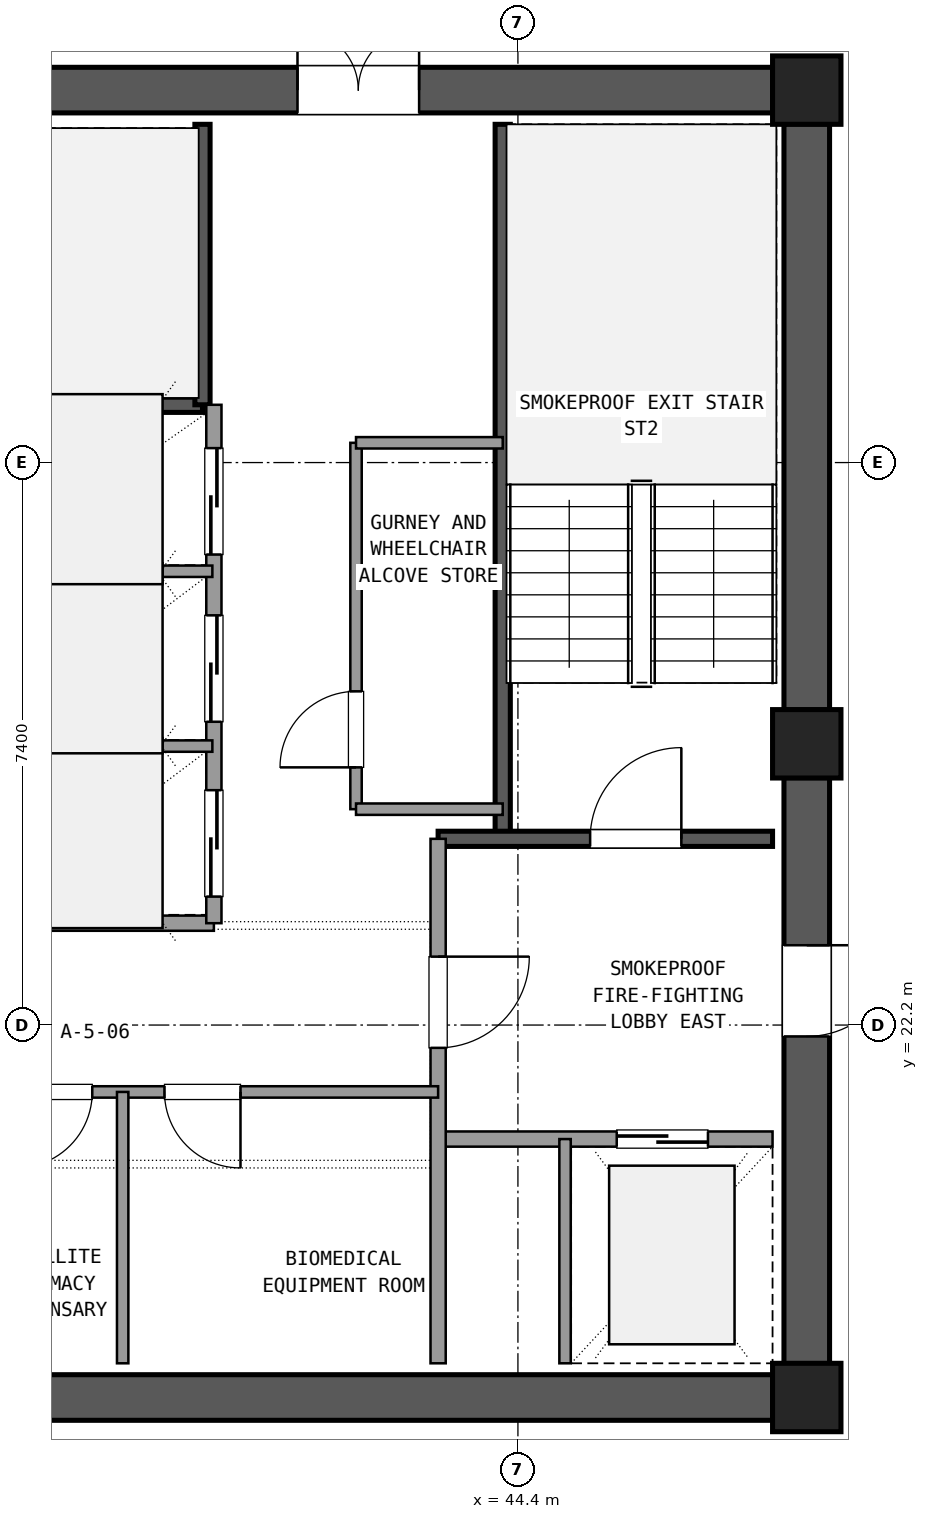
"""IFC4 building model, lengths in metres.
Left out: names, types, materials, properties, quantities, classifications, styles, units other than length and angle.
Written with IfcOpenShell. Run it as: python <this file> out.ifc"""

import sys

from ifc_helpers import new_model, si_unit, direction, frame, frame_2d, origin, origin_2d, place, context, subcontext, project, spatial, rectangle, extrude, element, fill, save


model = new_model("IFC4")
c1 = context("Model", 3, precision=1e-05, world=origin(), true_north=direction((0.0, 1.0)))
c2 = subcontext(c1, "Body", "Model", "MODEL_VIEW")
j1 = project(units=[si_unit("LENGTHUNIT", "METRE"), si_unit("PLANEANGLEUNIT", "RADIAN")], contexts=[c1])
p1 = place(None, origin())
s1 = spatial("IfcSite", under=j1, at=p1, CompositionType="ELEMENT")
p2 = place(p1, origin())
s2 = spatial("IfcBuilding", under=s1, at=p2, CompositionType="ELEMENT")
p3 = place(p2, frame((0.0, 0.0, 210.78)))
s3 = spatial("IfcBuildingStorey", under=s2, at=p3, CompositionType="ELEMENT", Elevation=210.78)
for number, where, z_axis, x_axis in (
    (1, (48.2, 17.3, 0.0), (0.0, 0.0, 1.0), (1.0, 0.0, 0.0)),
    (2, (48.2, 25.9, 0.0), (0.0, 0.0, 1.0), (1.0, 0.0, 0.0)),
    (3, (48.2, 34.5, 0.0), (0.0, 0.0, 1.0), (1.0, 0.0, 0.0)),
):
    element("IfcColumn", number, at=place(p3, frame(where, z_axis=z_axis, x_axis=x_axis)), inside=s3, PredefinedType="COLUMN", context=c2, shape_type="SweptSolid", body=[
        extrude(rectangle(XDim=0.9, YDim=0.9, at=origin_2d()), origin(), (0.0, 0.0, 1.0), 3.6),
    ])
p4 = place(p3, frame((37.445, 17.3, 0.0), z_axis=(0.0, 0.0, 1.0), x_axis=(1.0, 0.0, 0.0)))
e4 = element("IfcWall", 4, at=p4, inside=s3, PredefinedType="SHEAR", context=c2, shape_type="SweptSolid", body=[
    extrude(rectangle(XDim=10.31, YDim=0.6, at=frame_2d((5.155, 0.0))), origin(), (0.0, 0.0, 1.0), 3.32),
])
p5 = place(p3, frame((48.2, 17.745, 0.0), z_axis=(0.0, 0.0, 1.0), x_axis=(0.0, 1.0, 0.0)))
e5 = element("IfcWall", 5, at=p5, inside=s3, PredefinedType="SHEAR", context=c2, shape_type="SweptSolid", body=[
    extrude(rectangle(XDim=7.71, YDim=0.6, at=frame_2d((3.855, 0.0))), origin(), (0.0, 0.0, 1.0), 3.32),
])
p6 = place(p5, frame((4.305, 0.0, 0.0)))
e6 = element("IfcOpeningElement", 6, at=p6, cuts=e5, PredefinedType="OPENING", context=c2, shape_type="SweptSolid", body=[
    extrude(rectangle(XDim=1.2, YDim=2.15, at=frame_2d((0.6, 1.075))), frame((0.0, 0.31, 0.0), z_axis=(0.0, -1.0, 0.0), x_axis=(1.0, 0.0, 0.0)), (0.0, 0.0, 1.0), 0.62),
])
p7 = place(p3, frame((48.2, 26.345, 0.0), z_axis=(0.0, 0.0, 1.0), x_axis=(0.0, 1.0, 0.0)))
e7 = element("IfcWall", 7, at=p7, inside=s3, PredefinedType="SHEAR", context=c2, shape_type="SweptSolid", body=[
    extrude(rectangle(XDim=7.71, YDim=0.6, at=frame_2d((3.855, 0.0))), origin(), (0.0, 0.0, 1.0), 3.32),
])
p8 = place(p3, frame((47.755, 34.5, 0.0), z_axis=(0.0, 0.0, 1.0), x_axis=(-1.0, 0.0, 0.0)))
e8 = element("IfcWall", 8, at=p8, inside=s3, PredefinedType="SHEAR", context=c2, shape_type="SweptSolid", body=[
    extrude(rectangle(XDim=10.31, YDim=0.6, at=frame_2d((5.155, 0.0))), origin(), (0.0, 0.0, 1.0), 3.32),
])
p9 = place(p8, frame((4.655, 0.0, 0.0)))
e9 = element("IfcOpeningElement", 9, at=p9, cuts=e8, PredefinedType="OPENING", context=c2, shape_type="SweptSolid", body=[
    extrude(rectangle(XDim=1.6, YDim=2.2, at=frame_2d((0.8, 1.1))), frame((0.0, 0.31, 0.0), z_axis=(0.0, -1.0, 0.0), x_axis=(1.0, 0.0, 0.0)), (0.0, 0.0, 1.0), 0.62),
])
p10 = place(p3, frame((44.2, 24.65, 0.0), z_axis=(0.0, 0.0, 1.0), x_axis=(0.0, 1.0, 0.0)))
e10 = element("IfcWall", 10, at=p10, inside=s3, PredefinedType="SHEAR", context=c2, shape_type="SweptSolid", body=[
    extrude(rectangle(XDim=9.4, YDim=0.2, at=frame_2d((4.7, 0.0))), origin(), (0.0, 0.0, 1.0), 3.32),
])
p11 = place(p3, frame((43.35, 24.65, 0.0), z_axis=(0.0, 0.0, 1.0), x_axis=(1.0, 0.0, 0.0)))
e11 = element("IfcWall", 11, at=p11, inside=s3, PredefinedType="SHEAR", context=c2, shape_type="SweptSolid", body=[
    extrude(rectangle(XDim=4.4, YDim=0.2, at=frame_2d((2.2, 0.0))), origin(), (0.0, 0.0, 1.0), 3.32),
])
p12 = place(p11, frame((2.0, 0.0, 0.0)))
e12 = element("IfcOpeningElement", 12, at=p12, cuts=e11, PredefinedType="OPENING", context=c2, shape_type="SweptSolid", body=[
    extrude(rectangle(XDim=1.2, YDim=2.15, at=frame_2d((0.6, 1.075))), frame((0.0, 0.11, 0.0), z_axis=(0.0, -1.0, 0.0), x_axis=(1.0, 0.0, 0.0)), (0.0, 0.0, 1.0), 0.22),
])
p13 = place(p3, frame((30.75, 30.36, 0.0), z_axis=(0.0, 0.0, 1.0), x_axis=(1.0, 0.0, 0.0)))
e13 = element("IfcWall", 13, at=p13, inside=s3, PredefinedType="SHEAR", context=c2, shape_type="SweptSolid", body=[
    extrude(rectangle(XDim=9.5, YDim=0.2, at=frame_2d((4.75, 0.0))), origin(), (0.0, 0.0, 1.0), 3.32),
])
p14 = place(p3, frame((40.25, 30.36, 0.0), z_axis=(0.0, 0.0, 1.0), x_axis=(0.0, 1.0, 0.0)))
e14 = element("IfcWall", 14, at=p14, inside=s3, PredefinedType="SHEAR", context=c2, shape_type="SweptSolid", body=[
    extrude(rectangle(XDim=3.69, YDim=0.2, at=frame_2d((1.845, 0.0))), origin(), (0.0, 0.0, 1.0), 3.32),
])
p15 = place(p3, frame((43.35, 20.7, 0.0), z_axis=(0.0, 0.0, 1.0), x_axis=(1.0, 0.0, 0.0)))
e15 = element("IfcWall", 15, at=p15, inside=s3, PredefinedType="SOLIDWALL", context=c2, shape_type="SweptSolid", body=[
    extrude(rectangle(XDim=4.4, YDim=0.2, at=frame_2d((2.2, 0.0))), origin(), (0.0, 0.0, 1.0), 2.61),
])
p16 = place(p15, frame((2.35, 0.0, 0.0)))
e16 = element("IfcOpeningElement", 16, at=p16, cuts=e15, PredefinedType="OPENING", context=c2, shape_type="SweptSolid", body=[
    extrude(rectangle(XDim=1.2, YDim=2.15, at=frame_2d((0.6, 1.075))), frame((0.0, 0.11, 0.0), z_axis=(0.0, -1.0, 0.0), x_axis=(1.0, 0.0, 0.0)), (0.0, 0.0, 1.0), 0.22),
])
p17 = place(p3, frame((43.35, 17.75, 0.0), z_axis=(0.0, 0.0, 1.0), x_axis=(0.0, 1.0, 0.0)))
e17 = element("IfcWall", 17, at=p17, inside=s3, PredefinedType="SOLIDWALL", context=c2, shape_type="SweptSolid", body=[
    extrude(rectangle(XDim=6.9, YDim=0.2, at=frame_2d((3.45, 0.0))), origin(), (0.0, 0.0, 1.0), 2.61),
])
p18 = place(p17, frame((4.15, 0.0, 0.0)))
e18 = element("IfcOpeningElement", 18, at=p18, cuts=e17, PredefinedType="OPENING", context=c2, shape_type="SweptSolid", body=[
    extrude(rectangle(XDim=1.2, YDim=2.15, at=frame_2d((0.6, 1.075))), frame((0.0, 0.11, 0.0), z_axis=(0.0, -1.0, 0.0), x_axis=(1.0, 0.0, 0.0)), (0.0, 0.0, 1.0), 0.22),
])
p19 = place(p3, frame((45.02, 17.75, 0.0), z_axis=(0.0, 0.0, 1.0), x_axis=(0.0, 1.0, 0.0)))
e19 = element("IfcWall", 19, at=p19, inside=s3, PredefinedType="PARTITIONING", context=c2, shape_type="SweptSolid", body=[
    extrude(rectangle(XDim=2.95, YDim=0.15, at=frame_2d((1.475, 0.0))), origin(), (0.0, 0.0, 1.0), 2.61),
])
p20 = place(p3, frame((37.25, 21.32, 0.0), z_axis=(0.0, 0.0, 1.0), x_axis=(1.0, 0.0, 0.0)))
e20 = element("IfcWall", 20, at=p20, inside=s3, PredefinedType="PARTITIONING", context=c2, shape_type="SweptSolid", body=[
    extrude(rectangle(XDim=6.1, YDim=0.15, at=frame_2d((3.05, 0.0))), origin(), (0.0, 0.0, 1.0), 2.61),
])
p21 = place(p20, frame((0.55, 0.0, 0.0)))
e21 = element("IfcOpeningElement", 21, at=p21, cuts=e20, PredefinedType="OPENING", context=c2, shape_type="SweptSolid", body=[
    extrude(rectangle(XDim=1.0, YDim=2.15, at=frame_2d((0.5, 1.075))), frame((0.0, 0.085, 0.0), z_axis=(0.0, -1.0, 0.0), x_axis=(1.0, 0.0, 0.0)), (0.0, 0.0, 1.0), 0.17),
])
p22 = place(p20, frame((2.5, 0.0, 0.0)))
e22 = element("IfcOpeningElement", 22, at=p22, cuts=e20, PredefinedType="OPENING", context=c2, shape_type="SweptSolid", body=[
    extrude(rectangle(XDim=1.0, YDim=2.15, at=frame_2d((0.5, 1.075))), frame((0.0, 0.085, 0.0), z_axis=(0.0, -1.0, 0.0), x_axis=(1.0, 0.0, 0.0)), (0.0, 0.0, 1.0), 0.17),
])
p23 = place(p3, frame((39.2, 17.75, 0.0), z_axis=(0.0, 0.0, 1.0), x_axis=(0.0, 1.0, 0.0)))
e23 = element("IfcWall", 23, at=p23, inside=s3, PredefinedType="PARTITIONING", context=c2, shape_type="SweptSolid", body=[
    extrude(rectangle(XDim=3.57, YDim=0.15, at=frame_2d((1.785, 0.0))), origin(), (0.0, 0.0, 1.0), 2.61),
])
p24 = place(p3, frame((37.35, 23.54, 0.0), z_axis=(0.0, 0.0, 1.0), x_axis=(1.0, 0.0, 0.0)))
e24 = element("IfcWall", 24, at=p24, inside=s3, PredefinedType="SOLIDWALL", context=c2, shape_type="SweptSolid", body=[
    extrude(rectangle(XDim=3.05, YDim=0.2, at=frame_2d((1.525, 0.0))), origin(), (0.0, 0.0, 1.0), 2.61),
])
p25 = place(p3, frame((40.4, 23.54, 0.0), z_axis=(0.0, 0.0, 1.0), x_axis=(0.0, 1.0, 0.0)))
e25 = element("IfcWall", 25, at=p25, inside=s3, PredefinedType="SOLIDWALL", context=c2, shape_type="SweptSolid", body=[
    extrude(rectangle(XDim=6.82, YDim=0.2, at=frame_2d((3.41, 0.0))), origin(), (0.0, 0.0, 1.0), 2.61),
])
p26 = place(p25, frame((0.35, 0.0, 0.0)))
e26 = element("IfcOpeningElement", 26, at=p26, cuts=e25, PredefinedType="OPENING", context=c2, shape_type="SweptSolid", body=[
    extrude(rectangle(XDim=1.4, YDim=2.2, at=frame_2d((0.7, 1.1))), frame((0.0, 0.11, 0.0), z_axis=(0.0, -1.0, 0.0), x_axis=(1.0, 0.0, 0.0)), (0.0, 0.0, 1.0), 0.22),
])
p27 = place(p25, frame((2.65, 0.0, 0.0)))
e27 = element("IfcOpeningElement", 27, at=p27, cuts=e25, PredefinedType="OPENING", context=c2, shape_type="SweptSolid", body=[
    extrude(rectangle(XDim=1.4, YDim=2.2, at=frame_2d((0.7, 1.1))), frame((0.0, 0.11, 0.0), z_axis=(0.0, -1.0, 0.0), x_axis=(1.0, 0.0, 0.0)), (0.0, 0.0, 1.0), 0.22),
])
p28 = place(p25, frame((4.85, 0.0, 0.0)))
e28 = element("IfcOpeningElement", 28, at=p28, cuts=e25, PredefinedType="OPENING", context=c2, shape_type="SweptSolid", body=[
    extrude(rectangle(XDim=1.4, YDim=2.2, at=frame_2d((0.7, 1.1))), frame((0.0, 0.11, 0.0), z_axis=(0.0, -1.0, 0.0), x_axis=(1.0, 0.0, 0.0)), (0.0, 0.0, 1.0), 0.22),
])
for number, where, z_axis, x_axis in (
    (29, (37.37, 25.87, 0.0), (0.0, 0.0, 1.0), (1.0, 0.0, 0.0)),
    (30, (37.37, 28.17, 0.0), (0.0, 0.0, 1.0), (1.0, 0.0, 0.0)),
):
    element("IfcWall", number, at=place(p3, frame(where, z_axis=z_axis, x_axis=x_axis)), inside=s3, PredefinedType="PARTITIONING", context=c2, shape_type="SweptSolid", body=[
        extrude(rectangle(XDim=3.01, YDim=0.15, at=frame_2d((1.505, 0.0))), origin(), (0.0, 0.0, 1.0), 2.61),
    ])
p29 = place(p3, frame((42.27, 25.04, 0.0), z_axis=(0.0, 0.0, 1.0), x_axis=(0.0, 1.0, 0.0)))
e31 = element("IfcWall", 31, at=p29, inside=s3, PredefinedType="PARTITIONING", context=c2, shape_type="SweptSolid", body=[
    extrude(rectangle(XDim=4.82, YDim=0.15, at=frame_2d((2.41, 0.0))), origin(), (0.0, 0.0, 1.0), 2.61),
])
p30 = place(p29, frame((0.55, 0.0, 0.0)))
e32 = element("IfcOpeningElement", 32, at=p30, cuts=e31, PredefinedType="OPENING", context=c2, shape_type="SweptSolid", body=[
    extrude(rectangle(XDim=1.0, YDim=2.15, at=frame_2d((0.5, 1.075))), frame((0.0, 0.085, 0.0), z_axis=(0.0, -1.0, 0.0), x_axis=(1.0, 0.0, 0.0)), (0.0, 0.0, 1.0), 0.17),
])
for number, where, z_axis, x_axis in (
    (33, (42.27, 25.04, 0.0), (0.0, 0.0, 1.0), (1.0, 0.0, 0.0)),
    (34, (42.27, 29.86, 0.0), (0.0, 0.0, 1.0), (1.0, 0.0, 0.0)),
):
    element("IfcWall", number, at=place(p3, frame(where, z_axis=z_axis, x_axis=x_axis)), inside=s3, PredefinedType="PARTITIONING", context=c2, shape_type="SweptSolid", body=[
        extrude(rectangle(XDim=1.93, YDim=0.15, at=frame_2d((0.965, 0.0))), origin(), (0.0, 0.0, 1.0), 2.61),
    ])
p31 = place(p12, origin())
e35 = element("IfcDoor", 35, at=p31, inside=s3, OperationType="SINGLE_SWING_RIGHT", PredefinedType="DOOR", context=c2, shape_type="SweptSolid", body=[
    extrude(rectangle(XDim=1.2, YDim=2.15, at=frame_2d((0.6, 1.075))), frame((0.0, 0.025, 0.0), z_axis=(0.0, -1.0, 0.0), x_axis=(1.0, 0.0, 0.0)), (0.0, 0.0, 1.0), 0.05),
])
fill(e12, e35)
p32 = place(p16, origin())
e36 = element("IfcDoor", 36, at=p32, inside=s3, OperationType="SLIDING_TO_RIGHT", PredefinedType="DOOR", context=c2, shape_type="SweptSolid", body=[
    extrude(rectangle(XDim=1.2, YDim=2.15, at=frame_2d((0.6, 1.075))), frame((0.0, 0.025, 0.0), z_axis=(0.0, -1.0, 0.0), x_axis=(1.0, 0.0, 0.0)), (0.0, 0.0, 1.0), 0.05),
])
fill(e16, e36)
p33 = place(p18, frame((1.2, 0.0, 0.0), z_axis=(0.0, 0.0, 1.0), x_axis=(-1.0, 0.0, 0.0)))
e37 = element("IfcDoor", 37, at=p33, inside=s3, OperationType="SINGLE_SWING_RIGHT", PredefinedType="DOOR", context=c2, shape_type="SweptSolid", body=[
    extrude(rectangle(XDim=1.2, YDim=2.15, at=frame_2d((0.6, 1.075))), frame((0.0, 0.025, 0.0), z_axis=(0.0, -1.0, 0.0), x_axis=(1.0, 0.0, 0.0)), (0.0, 0.0, 1.0), 0.05),
])
fill(e18, e37)
p34 = place(p6, frame((1.2, 0.0, 0.0), z_axis=(0.0, 0.0, 1.0), x_axis=(-1.0, 0.0, 0.0)))
e38 = element("IfcDoor", 38, at=p34, inside=s3, OperationType="SINGLE_SWING_RIGHT", PredefinedType="DOOR", context=c2, shape_type="SweptSolid", body=[
    extrude(rectangle(XDim=1.2, YDim=2.15, at=frame_2d((0.6, 1.075))), frame((0.0, 0.025, 0.0), z_axis=(0.0, -1.0, 0.0), x_axis=(1.0, 0.0, 0.0)), (0.0, 0.0, 1.0), 0.05),
])
fill(e6, e38)
p35 = place(p9, frame((1.6, 0.0, 0.0), z_axis=(0.0, 0.0, 1.0), x_axis=(-1.0, 0.0, 0.0)))
e39 = element("IfcDoor", 39, at=p35, inside=s3, OperationType="DOUBLE_DOOR_SINGLE_SWING", PredefinedType="DOOR", context=c2, shape_type="SweptSolid", body=[
    extrude(rectangle(XDim=1.6, YDim=2.2, at=frame_2d((0.8, 1.1))), frame((0.0, 0.025, 0.0), z_axis=(0.0, -1.0, 0.0), x_axis=(1.0, 0.0, 0.0)), (0.0, 0.0, 1.0), 0.05),
])
fill(e9, e39)
p36 = place(p21, frame((1.0, 0.0, 0.0), z_axis=(0.0, 0.0, 1.0), x_axis=(-1.0, 0.0, 0.0)))
e40 = element("IfcDoor", 40, at=p36, inside=s3, OperationType="SINGLE_SWING_LEFT", PredefinedType="DOOR", context=c2, shape_type="SweptSolid", body=[
    extrude(rectangle(XDim=1.0, YDim=2.15, at=frame_2d((0.5, 1.075))), frame((0.0, 0.025, 0.0), z_axis=(0.0, -1.0, 0.0), x_axis=(1.0, 0.0, 0.0)), (0.0, 0.0, 1.0), 0.05),
])
fill(e21, e40)
p37 = place(p22, frame((1.0, 0.0, 0.0), z_axis=(0.0, 0.0, 1.0), x_axis=(-1.0, 0.0, 0.0)))
e41 = element("IfcDoor", 41, at=p37, inside=s3, OperationType="SINGLE_SWING_RIGHT", PredefinedType="DOOR", context=c2, shape_type="SweptSolid", body=[
    extrude(rectangle(XDim=1.0, YDim=2.15, at=frame_2d((0.5, 1.075))), frame((0.0, 0.025, 0.0), z_axis=(0.0, -1.0, 0.0), x_axis=(1.0, 0.0, 0.0)), (0.0, 0.0, 1.0), 0.05),
])
fill(e22, e41)
p38 = place(p26, origin())
e42 = element("IfcDoor", 42, at=p38, inside=s3, OperationType="SLIDING_TO_LEFT", PredefinedType="DOOR", context=c2, shape_type="SweptSolid", body=[
    extrude(rectangle(XDim=1.4, YDim=2.2, at=frame_2d((0.7, 1.1))), frame((0.0, 0.025, 0.0), z_axis=(0.0, -1.0, 0.0), x_axis=(1.0, 0.0, 0.0)), (0.0, 0.0, 1.0), 0.05),
])
fill(e26, e42)
p39 = place(p27, origin())
e43 = element("IfcDoor", 43, at=p39, inside=s3, OperationType="SLIDING_TO_LEFT", PredefinedType="DOOR", context=c2, shape_type="SweptSolid", body=[
    extrude(rectangle(XDim=1.4, YDim=2.2, at=frame_2d((0.7, 1.1))), frame((0.0, 0.025, 0.0), z_axis=(0.0, -1.0, 0.0), x_axis=(1.0, 0.0, 0.0)), (0.0, 0.0, 1.0), 0.05),
])
fill(e27, e43)
p40 = place(p28, origin())
e44 = element("IfcDoor", 44, at=p40, inside=s3, OperationType="SLIDING_TO_RIGHT", PredefinedType="DOOR", context=c2, shape_type="SweptSolid", body=[
    extrude(rectangle(XDim=1.4, YDim=2.2, at=frame_2d((0.7, 1.1))), frame((0.0, 0.025, 0.0), z_axis=(0.0, -1.0, 0.0), x_axis=(1.0, 0.0, 0.0)), (0.0, 0.0, 1.0), 0.05),
])
fill(e28, e44)
p41 = place(p30, origin())
e45 = element("IfcDoor", 45, at=p41, inside=s3, OperationType="SINGLE_SWING_LEFT", PredefinedType="DOOR", context=c2, shape_type="SweptSolid", body=[
    extrude(rectangle(XDim=1.0, YDim=2.15, at=frame_2d((0.5, 1.075))), frame((0.0, 0.025, 0.0), z_axis=(0.0, -1.0, 0.0), x_axis=(1.0, 0.0, 0.0)), (0.0, 0.0, 1.0), 0.05),
])
fill(e32, e45)
save(model, sys.argv[1])
